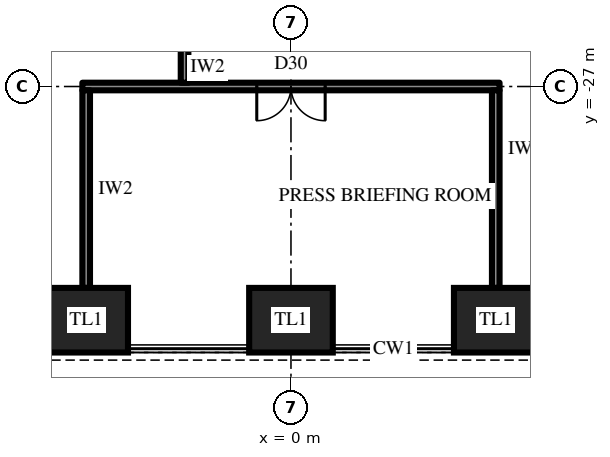
"""IFC4 building model, lengths in metres.
Left out: names, types, materials, properties, quantities, classifications, styles, units other than length and angle.
Written with IfcOpenShell. Run it as: python <this file> out.ifc"""

import sys

from ifc_helpers import new_model, si_unit, direction, frame, frame_2d, origin, origin_2d, place, context, subcontext, project, spatial, rectangle, extrude, element, fill, save


model = new_model("IFC4")
c1 = context("Model", 3, precision=1e-05, world=origin(), true_north=direction((0.0, 1.0)))
c2 = subcontext(c1, "Body", "Model", "MODEL_VIEW")
j1 = project(units=[si_unit("LENGTHUNIT", "METRE"), si_unit("PLANEANGLEUNIT", "RADIAN")], contexts=[c1])
p1 = place(None, origin())
s1 = spatial("IfcSite", under=j1, at=p1, CompositionType="ELEMENT")
p2 = place(p1, origin())
s2 = spatial("IfcBuilding", under=s1, at=p2, CompositionType="ELEMENT")
p3 = place(p2, frame((0.0, 0.0, 103.3)))
s3 = spatial("IfcBuildingStorey", under=s2, at=p3, CompositionType="ELEMENT", Elevation=103.3)
for number, where, z_axis, x_axis in (
    (1, (-5.389, -33.15, 0.0), (0.0, 0.0, 1.0), (1.0, 0.0, 0.0)),
    (2, (0.0, -33.15, 0.0), (0.0, 0.0, 1.0), (1.0, 0.0, 0.0)),
    (3, (5.389, -33.15, 0.0), (0.0, 0.0, 1.0), (1.0, 0.0, 0.0)),
):
    element("IfcColumn", number, at=place(p3, frame(where, z_axis=z_axis, x_axis=x_axis)), inside=s3, PredefinedType="COLUMN", context=c2, shape_type="SweptSolid", body=[
        extrude(rectangle(XDim=2.2, YDim=1.7, at=origin_2d()), origin(), (0.0, 0.0, 1.0), 4.2),
    ])
p4 = place(p3, frame((-5.489, -27.0, 0.0), z_axis=(0.0, 0.0, 1.0), x_axis=(1.0, 0.0, 0.0)))
e4 = element("IfcWall", 4, at=p4, inside=s3, PredefinedType="PARTITIONING", context=c2, shape_type="SweptSolid", body=[
    extrude(rectangle(XDim=10.977, YDim=0.2, at=frame_2d((5.489, 0.0))), origin(), (0.0, 0.0, 1.0), 3.9),
])
p5 = place(p4, frame((4.589, 0.0, 0.0)))
e5 = element("IfcOpeningElement", 5, at=p5, cuts=e4, PredefinedType="OPENING", context=c2, shape_type="SweptSolid", body=[
    extrude(rectangle(XDim=1.8, YDim=2.4, at=frame_2d((0.9, 1.2))), frame((0.0, 0.11, 0.0), z_axis=(0.0, -1.0, 0.0), x_axis=(1.0, 0.0, 0.0)), (0.0, 0.0, 1.0), 0.22),
])
for number, where, z_axis, x_axis in (
    (6, (-5.389, -27.1, 0.0), (0.0, 0.0, 1.0), (0.0, -1.0, 0.0)),
    (7, (5.389, -27.1, 0.0), (0.0, 0.0, 1.0), (0.0, -1.0, 0.0)),
):
    element("IfcWall", number, at=place(p3, frame(where, z_axis=z_axis, x_axis=x_axis)), inside=s3, PredefinedType="PARTITIONING", context=c2, shape_type="SweptSolid", body=[
        extrude(rectangle(XDim=5.2, YDim=0.2, at=frame_2d((2.6, 0.0))), origin(), (0.0, 0.0, 1.0), 2.844),
    ])
p6 = place(p3, frame((-2.8, -18.2, 0.0), z_axis=(0.0, 0.0, 1.0), x_axis=(0.0, -1.0, 0.0)))
e8 = element("IfcWall", 8, at=p6, inside=s3, PredefinedType="PARTITIONING", context=c2, shape_type="SweptSolid", body=[
    extrude(rectangle(XDim=8.7, YDim=0.2, at=frame_2d((4.35, 0.0))), origin(), (0.0, 0.0, 1.0), 2.844),
])
p7 = place(p6, frame((0.37, 0.0, 0.0)))
e9 = element("IfcOpeningElement", 9, at=p7, cuts=e8, PredefinedType="OPENING", context=c2, shape_type="SweptSolid", body=[
    extrude(rectangle(XDim=1.0, YDim=2.2, at=frame_2d((0.5, 1.1))), frame((0.0, 0.11, 0.0), z_axis=(0.0, -1.0, 0.0), x_axis=(1.0, 0.0, 0.0)), (0.0, 0.0, 1.0), 0.22),
])
p8 = place(p5, frame((1.8, 0.0, 0.0), z_axis=(0.0, 0.0, 1.0), x_axis=(-1.0, 0.0, 0.0)))
e10 = element("IfcDoor", 10, at=p8, inside=s3, OperationType="DOUBLE_DOOR_SINGLE_SWING", PredefinedType="DOOR", context=c2, shape_type="SweptSolid", body=[
    extrude(rectangle(XDim=1.8, YDim=2.4, at=frame_2d((0.9, 1.2))), frame((0.0, 0.025, 0.0), z_axis=(0.0, -1.0, 0.0), x_axis=(1.0, 0.0, 0.0)), (0.0, 0.0, 1.0), 0.05),
])
fill(e5, e10)
save(model, sys.argv[1])
